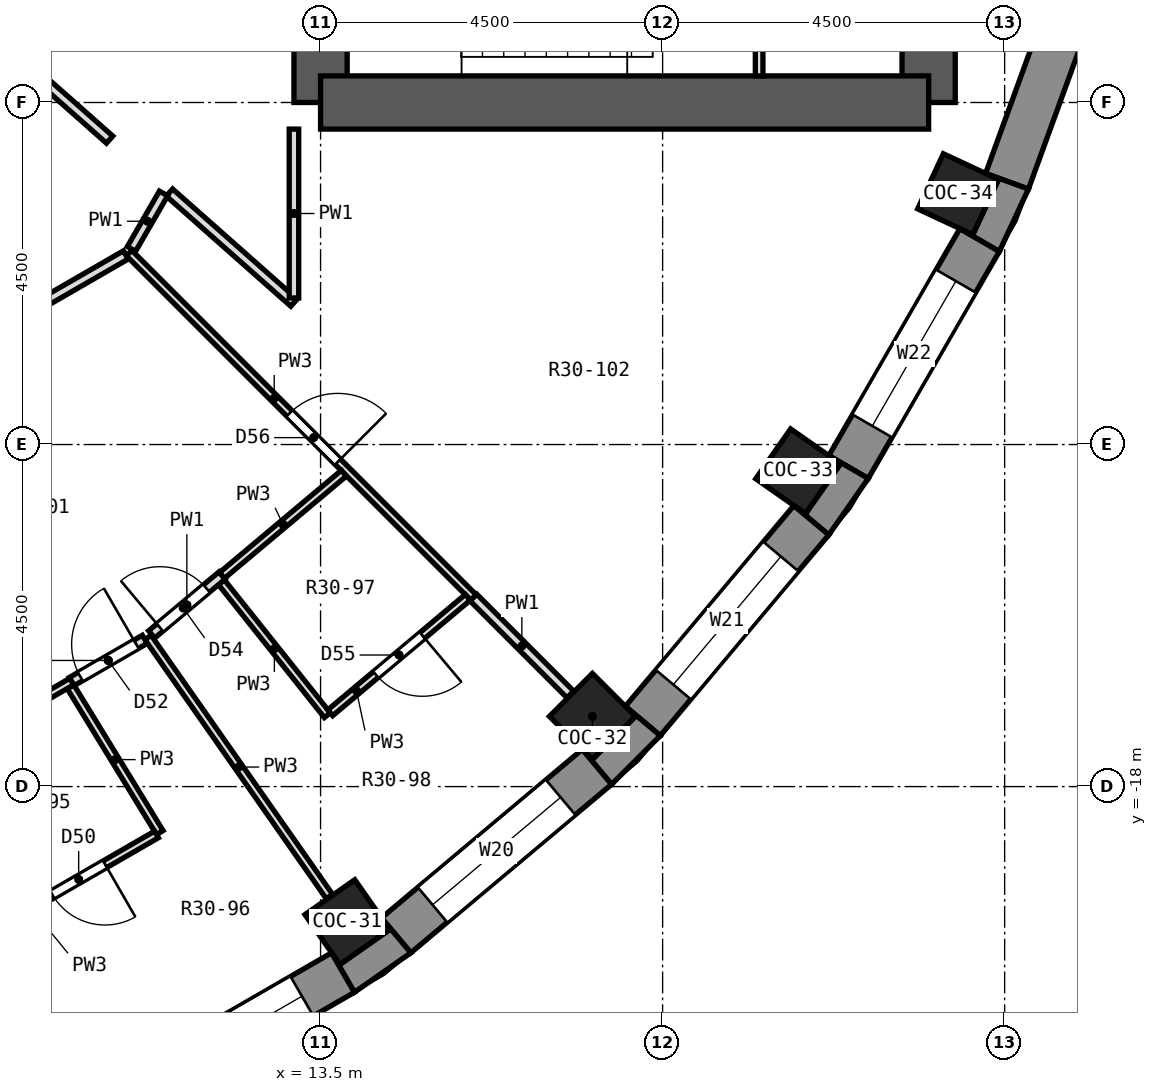
"""IFC4 building model, lengths in metres.
Left out: names, types, materials, properties, quantities, classifications, styles, units other than length and angle.
Written with IfcOpenShell. Run it as: python <this file> out.ifc"""

import sys

from ifc_helpers import new_model, si_unit, direction, frame, frame_2d, origin, origin_2d, place, context, subcontext, project, spatial, polyline, rectangle, outline, extrude, element, fill, save


model = new_model("IFC4")
c1 = context("Model", 3, precision=1e-05, world=origin(), true_north=direction((0.0, 1.0)))
c2 = subcontext(c1, "Body", "Model", "MODEL_VIEW")
j1 = project(units=[si_unit("LENGTHUNIT", "METRE"), si_unit("PLANEANGLEUNIT", "RADIAN")], contexts=[c1])
p1 = place(None, origin())
s1 = spatial("IfcSite", under=j1, at=p1, CompositionType="ELEMENT")
p2 = place(p1, origin())
s2 = spatial("IfcBuilding", under=s1, at=p2, CompositionType="ELEMENT")
p3 = place(p2, frame((0.0, 0.0, 210.3)))
s3 = spatial("IfcBuildingStorey", under=s2, at=p3, CompositionType="ELEMENT", Elevation=210.3)
for number, where, z_axis, x_axis in (
    (1, (13.852, -19.782, 0.0), (0.0, 0.0, 1.0), (0.574, -0.819, 0.0)),
    (2, (17.077, -17.077, 0.0), (0.0, 0.0, 1.0), (0.707, -0.707, 0.0)),
    (3, (19.782, -13.852, 0.0), (0.0, 0.0, 1.0), (0.819, -0.574, 0.0)),
    (4, (21.887, -10.206, 0.0), (0.0, 0.0, 1.0), (0.906, -0.423, 0.0)),
):
    element("IfcColumn", number, at=place(p3, frame(where, z_axis=z_axis, x_axis=x_axis)), inside=s3, PredefinedType="COLUMN", context=c2, shape_type="SweptSolid", body=[
        extrude(rectangle(XDim=0.8, YDim=0.8, at=origin_2d()), origin(), (0.0, 0.0, 1.0), 3.3),
    ])
p4 = place(p3, frame((13.5, -9.0, 0.0), z_axis=(0.0, 0.0, 1.0), x_axis=(0.0, 1.0, 0.0)))
e5 = element("IfcWall", 5, at=p4, inside=s3, PredefinedType="SHEAR", context=c2, shape_type="SweptSolid", body=[
    extrude(rectangle(XDim=18.0, YDim=0.7, at=frame_2d((9.0, 0.0))), origin(), (0.0, 0.0, 1.0), 3.3),
])
p5 = place(p4, frame((15.4, 0.0, 0.0)))
e6 = element("IfcOpeningElement", 6, at=p5, cuts=e5, PredefinedType="OPENING", context=c2, shape_type="SweptSolid", body=[
    extrude(rectangle(XDim=1.2, YDim=2.1, at=frame_2d((0.6, 1.05))), frame((0.0, 0.362, 0.0), z_axis=(0.0, -1.0, 0.0), x_axis=(1.0, 0.0, 0.0)), (0.0, 0.0, 1.0), 0.724),
])
p6 = place(p4, frame((1.4, 0.0, 0.0)))
e7 = element("IfcOpeningElement", 7, at=p6, cuts=e5, PredefinedType="OPENING", context=c2, shape_type="SweptSolid", body=[
    extrude(rectangle(XDim=1.2, YDim=2.1, at=frame_2d((0.6, 1.05))), frame((0.0, 0.362, 0.0), z_axis=(0.0, -1.0, 0.0), x_axis=(1.0, 0.0, 0.0)), (0.0, 0.0, 1.0), 0.724),
])
p7 = place(p4, frame((7.5, 0.0, 0.0)))
e8 = element("IfcOpeningElement", 8, at=p7, cuts=e5, PredefinedType="OPENING", context=c2, shape_type="SweptSolid", body=[
    extrude(rectangle(XDim=3.0, YDim=2.4, at=frame_2d((1.5, 1.2))), frame((0.0, 0.362, 0.0), z_axis=(0.0, -1.0, 0.0), x_axis=(1.0, 0.0, 0.0)), (0.0, 0.0, 1.0), 0.724),
])
p8 = place(p3, frame((21.5, -9.0, 0.0), z_axis=(0.0, 0.0, 1.0), x_axis=(0.0, 1.0, 0.0)))
e9 = element("IfcWall", 9, at=p8, inside=s3, PredefinedType="SHEAR", context=c2, shape_type="SweptSolid", body=[
    extrude(rectangle(XDim=18.0, YDim=0.7, at=frame_2d((9.0, 0.0))), origin(), (0.0, 0.0, 1.0), 3.3),
])
p9 = place(p8, frame((9.45, 0.0, 0.0)))
e10 = element("IfcOpeningElement", 10, at=p9, cuts=e9, PredefinedType="OPENING", context=c2, shape_type="SweptSolid", body=[
    extrude(rectangle(XDim=0.9, YDim=2.1, at=frame_2d((0.45, 1.05))), frame((0.0, 0.362, 0.0), z_axis=(0.0, -1.0, 0.0), x_axis=(1.0, 0.0, 0.0)), (0.0, 0.0, 1.0), 0.724),
])
p10 = place(p8, frame((7.65, 0.0, 0.0)))
e11 = element("IfcOpeningElement", 11, at=p10, cuts=e9, PredefinedType="OPENING", context=c2, shape_type="SweptSolid", body=[
    extrude(rectangle(XDim=0.9, YDim=2.1, at=frame_2d((0.45, 1.05))), frame((0.0, 0.362, 0.0), z_axis=(0.0, -1.0, 0.0), x_axis=(1.0, 0.0, 0.0)), (0.0, 0.0, 1.0), 0.724),
])
p11 = place(p3, frame((13.5, -9.0, 0.0), z_axis=(0.0, 0.0, 1.0), x_axis=(1.0, 0.0, 0.0)))
e12 = element("IfcWall", 12, at=p11, inside=s3, PredefinedType="SHEAR", context=c2, shape_type="SweptSolid", body=[
    extrude(rectangle(XDim=8.0, YDim=0.7, at=frame_2d((4.0, 0.0))), origin(), (0.0, 0.0, 1.0), 3.3),
])
p12 = place(p3, frame((10.809, -22.171, 0.0), z_axis=(0.0, 0.0, 1.0), x_axis=(0.86602648383, 0.499998129301, 0.0)))
e13 = element("IfcWall", 13, at=p12, inside=s3, PredefinedType="SOLIDWALL", context=c2, shape_type="SweptSolid", body=[
    extrude(rectangle(XDim=3.45, YDim=0.6, at=frame_2d((1.725, 0.0))), origin(), (0.0, 0.0, 1.0), 2.85),
])
p13 = place(p12, frame((0.625, 0.0, 0.9)))
e14 = element("IfcOpeningElement", 14, at=p13, cuts=e13, PredefinedType="OPENING", context=c2, shape_type="SweptSolid", body=[
    extrude(rectangle(XDim=2.2, YDim=1.8, at=frame_2d((1.1, 0.9))), frame((0.0, 0.312, 0.0), z_axis=(0.0, -1.0, 0.0), x_axis=(1.0, 0.0, 0.0)), (0.0, 0.0, 1.0), 0.624),
])
p14 = place(p3, frame((14.494, -19.957, 0.0), z_axis=(0.0, 0.0, 1.0), x_axis=(0.766058884809, 0.642770398358, 0.0)))
e15 = element("IfcWall", 15, at=p14, inside=s3, PredefinedType="SOLIDWALL", context=c2, shape_type="SweptSolid", body=[
    extrude(rectangle(XDim=3.449, YDim=0.6, at=frame_2d((1.725, 0.0))), origin(), (0.0, 0.0, 1.0), 2.85),
])
p15 = place(p14, frame((0.625, 0.0, 0.9)))
e16 = element("IfcOpeningElement", 16, at=p15, cuts=e15, PredefinedType="OPENING", context=c2, shape_type="SweptSolid", body=[
    extrude(rectangle(XDim=2.2, YDim=1.8, at=frame_2d((1.1, 0.9))), frame((0.0, 0.312, 0.0), z_axis=(0.0, -1.0, 0.0), x_axis=(1.0, 0.0, 0.0)), (0.0, 0.0, 1.0), 0.624),
])
p16 = place(p3, frame((17.74, -17.137, 0.0), z_axis=(0.0, 0.0, 1.0), x_axis=(0.642770398358, 0.766058884809, 0.0)))
e17 = element("IfcWall", 17, at=p16, inside=s3, PredefinedType="SOLIDWALL", context=c2, shape_type="SweptSolid", body=[
    extrude(rectangle(XDim=3.449, YDim=0.6, at=frame_2d((1.725, 0.0))), origin(), (0.0, 0.0, 1.0), 2.85),
])
p17 = place(p16, frame((0.625, 0.0, 0.9)))
e18 = element("IfcOpeningElement", 18, at=p17, cuts=e17, PredefinedType="OPENING", context=c2, shape_type="SweptSolid", body=[
    extrude(rectangle(XDim=2.2, YDim=1.8, at=frame_2d((1.1, 0.9))), frame((0.0, 0.312, 0.0), z_axis=(0.0, -1.0, 0.0), x_axis=(1.0, 0.0, 0.0)), (0.0, 0.0, 1.0), 0.624),
])
p18 = place(p3, frame((20.446, -13.796, 0.0), z_axis=(0.0, 0.0, 1.0), x_axis=(0.499998129301, 0.86602648383, 0.0)))
e19 = element("IfcWall", 19, at=p18, inside=s3, PredefinedType="SOLIDWALL", context=c2, shape_type="SweptSolid", body=[
    extrude(rectangle(XDim=3.45, YDim=0.6, at=frame_2d((1.725, 0.0))), origin(), (0.0, 0.0, 1.0), 2.85),
])
p19 = place(p18, frame((0.625, 0.0, 0.9)))
e20 = element("IfcOpeningElement", 20, at=p19, cuts=e19, PredefinedType="OPENING", context=c2, shape_type="SweptSolid", body=[
    extrude(rectangle(XDim=2.2, YDim=1.8, at=frame_2d((1.1, 0.9))), frame((0.0, 0.312, 0.0), z_axis=(0.0, -1.0, 0.0), x_axis=(1.0, 0.0, 0.0)), (0.0, 0.0, 1.0), 0.624),
])
p20 = place(p3, frame((22.531, -10.036, 0.0), z_axis=(0.0, 0.0, 1.0), x_axis=(0.342032843455, 0.93968799822, 0.0)))
e21 = element("IfcWall", 21, at=p20, inside=s3, PredefinedType="SOLIDWALL", context=c2, shape_type="SweptSolid", body=[
    extrude(rectangle(XDim=3.45, YDim=0.6, at=frame_2d((1.725, 0.0))), origin(), (0.0, 0.0, 1.0), 2.85),
])
p21 = place(p3, origin())
e22 = element("IfcWall", 22, at=p21, inside=s3, PredefinedType="SOLIDWALL", context=c2, shape_type="SweptSolid", body=[
    extrude(outline(polyline([(13.946, -20.706), (14.687, -20.187), (14.302, -19.727), (14.409, -19.881), (13.754, -20.34), (13.646, -20.186), (13.946, -20.706)])), origin(), (0.0, 0.0, 1.0), 2.85),
])
p22 = place(p3, origin())
e23 = element("IfcWall", 23, at=p22, inside=s3, PredefinedType="SOLIDWALL", context=c2, shape_type="SweptSolid", body=[
    extrude(outline(polyline([(17.969, -17.33), (17.51, -16.944), (17.642, -17.077), (17.077, -17.642), (16.944, -17.51), (17.33, -17.969), (17.969, -17.33)])), origin(), (0.0, 0.0, 1.0), 2.85),
])
p23 = place(p3, origin())
e24 = element("IfcWall", 24, at=p23, inside=s3, PredefinedType="SOLIDWALL", context=c2, shape_type="SweptSolid", body=[
    extrude(outline(polyline([(20.187, -14.687), (20.706, -13.946), (20.186, -13.646), (20.34, -13.754), (19.881, -14.409), (19.727, -14.302), (20.187, -14.687)])), origin(), (0.0, 0.0, 1.0), 2.85),
])
p24 = place(p3, origin())
e25 = element("IfcWall", 25, at=p24, inside=s3, PredefinedType="SOLIDWALL", context=c2, shape_type="SweptSolid", body=[
    extrude(outline(polyline([(22.813, -10.139), (22.249, -9.934), (22.419, -10.013), (22.081, -10.738), (21.911, -10.659), (22.431, -10.959), (22.813, -10.139)])), origin(), (0.0, 0.0, 1.0), 2.85),
])
p25 = place(p3, frame((8.275, -17.745, 0.0), z_axis=(0.0, 0.0, 1.0), x_axis=(0.42246777717, -0.906377943936, 0.0)))
e26 = element("IfcWall", 26, at=p25, inside=s3, PredefinedType="PARTITIONING", context=c2, shape_type="SweptSolid", body=[
    extrude(rectangle(XDim=4.16, YDim=0.1, at=frame_2d((2.08, 0.0))), origin(), (0.0, 0.0, 1.0), 2.85),
])
p26 = place(p3, frame((10.21, -16.686, 0.0), z_axis=(0.0, 0.0, 1.0), x_axis=(0.522037907824, -0.852922284147, 0.0)))
e27 = element("IfcWall", 27, at=p26, inside=s3, PredefinedType="PARTITIONING", context=c2, shape_type="SweptSolid", body=[
    extrude(rectangle(XDim=2.25, YDim=0.1, at=frame_2d((1.125, 0.0))), origin(), (0.0, 0.0, 1.0), 2.85),
])
p27 = place(p3, frame((11.23, -16.038, 0.0), z_axis=(0.0, 0.0, 1.0), x_axis=(0.573525346877, -0.81918781515, 0.0)))
e28 = element("IfcWall", 28, at=p27, inside=s3, PredefinedType="PARTITIONING", context=c2, shape_type="SweptSolid", body=[
    extrude(rectangle(XDim=4.161, YDim=0.1, at=frame_2d((2.081, 0.0))), origin(), (0.0, 0.0, 1.0), 2.85),
])
p28 = place(p3, frame((12.195, -15.311, 0.0), z_axis=(0.0, 0.0, 1.0), x_axis=(0.623070217722, -0.782165905539, 0.0)))
e29 = element("IfcWall", 29, at=p28, inside=s3, PredefinedType="PARTITIONING", context=c2, shape_type="SweptSolid", body=[
    extrude(rectangle(XDim=2.237, YDim=0.1, at=frame_2d((1.119, 0.0))), origin(), (0.0, 0.0, 1.0), 2.85),
])
p29 = place(p3, frame((10.981, -10.981, 0.0), z_axis=(0.0, 0.0, 1.0), x_axis=(0.707106781187, -0.707106781187, 0.0)))
e30 = element("IfcWall", 30, at=p29, inside=s3, PredefinedType="PARTITIONING", context=c2, shape_type="SweptSolid", body=[
    extrude(rectangle(XDim=6.408, YDim=0.1, at=frame_2d((3.204, 0.0))), origin(), (0.0, 0.0, 1.0), 2.85),
])
p30 = place(p29, frame((2.984, 0.0, 0.0)))
e31 = element("IfcOpeningElement", 31, at=p30, cuts=e30, PredefinedType="OPENING", context=c2, shape_type="SweptSolid", body=[
    extrude(rectangle(XDim=0.9, YDim=2.1, at=frame_2d((0.45, 1.05))), frame((0.0, 0.062, 0.0), z_axis=(0.0, -1.0, 0.0), x_axis=(1.0, 0.0, 0.0)), (0.0, 0.0, 1.0), 0.124),
])
p31 = place(p3, frame((15.511, -15.513, 0.0), z_axis=(0.0, 0.0, 1.0), x_axis=(0.707106781187, -0.707106781187, 0.0)))
e32 = element("IfcWall", 32, at=p31, inside=s3, PredefinedType="PARTITIONING", context=c2, shape_type="SweptSolid", body=[
    extrude(rectangle(XDim=1.802, YDim=0.125, at=frame_2d((0.901, 0.0))), origin(), (0.0, 0.0, 1.0), 2.85),
])
p32 = place(p3, frame((6.42, -5.68, 0.0), z_axis=(0.0, 0.0, 1.0), x_axis=(0.74898196967, -0.662590378068, 0.0)))
e33 = element("IfcWall", 33, at=p32, inside=s3, PredefinedType="PARTITIONING", context=c2, shape_type="SweptSolid", body=[
    extrude(rectangle(XDim=5.748, YDim=0.125, at=frame_2d((2.874, 0.0))), origin(), (0.0, 0.0, 1.0), 2.85),
])
p33 = place(p3, frame((11.512, -10.185, 0.0), z_axis=(0.0, 0.0, 1.0), x_axis=(0.748928386133, -0.66265094314, 0.0)))
e34 = element("IfcWall", 34, at=p33, inside=s3, PredefinedType="PARTITIONING", context=c2, shape_type="SweptSolid", body=[
    extrude(rectangle(XDim=2.187, YDim=0.125, at=frame_2d((1.094, 0.0))), origin(), (0.0, 0.0, 1.0), 2.85),
])
p34 = place(p3, frame((9.293, -19.812, 0.0), z_axis=(0.0, 0.0, 1.0), x_axis=(0.866139183788, 0.49980287545, 0.0)))
e35 = element("IfcWall", 35, at=p34, inside=s3, PredefinedType="PARTITIONING", context=c2, shape_type="SweptSolid", body=[
    extrude(rectangle(XDim=2.365, YDim=0.1, at=frame_2d((1.183, 0.0))), origin(), (0.0, 0.0, 1.0), 2.85),
])
p35 = place(p34, frame((0.782, 0.0, 0.0)))
e36 = element("IfcOpeningElement", 36, at=p35, cuts=e35, PredefinedType="OPENING", context=c2, shape_type="SweptSolid", body=[
    extrude(rectangle(XDim=0.8, YDim=2.1, at=frame_2d((0.4, 1.05))), frame((0.0, 0.062, 0.0), z_axis=(0.0, -1.0, 0.0), x_axis=(1.0, 0.0, 0.0)), (0.0, 0.0, 1.0), 0.124),
])
p36 = place(p3, frame((8.318, -17.72, 0.0), z_axis=(0.0, 0.0, 1.0), x_axis=(0.866039875853, 0.499974932805, 0.0)))
e37 = element("IfcWall", 37, at=p36, inside=s3, PredefinedType="PARTITIONING", context=c2, shape_type="SweptSolid", body=[
    extrude(rectangle(XDim=2.204, YDim=0.1, at=frame_2d((1.102, 0.0))), origin(), (0.0, 0.0, 1.0), 2.85),
])
p37 = place(p3, frame((10.227, -16.618, 0.0), z_axis=(0.0, 0.0, 1.0), x_axis=(0.865642357341, 0.50066286978, 0.0)))
e38 = element("IfcWall", 38, at=p37, inside=s3, PredefinedType="PARTITIONING", context=c2, shape_type="SweptSolid", body=[
    extrude(rectangle(XDim=1.108, YDim=0.125, at=frame_2d((0.554, 0.0))), origin(), (0.0, 0.0, 1.0), 2.85),
])
p38 = place(p37, frame((0.129, 0.0, 0.0)))
e39 = element("IfcOpeningElement", 39, at=p38, cuts=e38, PredefinedType="OPENING", context=c2, shape_type="SweptSolid", body=[
    extrude(rectangle(XDim=0.85, YDim=2.1, at=frame_2d((0.425, 1.05))), frame((0.0, 0.074, 0.0), z_axis=(0.0, -1.0, 0.0), x_axis=(1.0, 0.0, 0.0)), (0.0, 0.0, 1.0), 0.149),
])
p39 = place(p3, frame((4.073, -14.969, 0.0), z_axis=(0.0, 0.0, 1.0), x_axis=(0.866056845741, 0.499945536979, 0.0)))
e40 = element("IfcWall", 40, at=p39, inside=s3, PredefinedType="PARTITIONING", context=c2, shape_type="SweptSolid", body=[
    extrude(rectangle(XDim=7.926, YDim=0.125, at=frame_2d((3.963, 0.0))), origin(), (0.0, 0.0, 1.0), 2.85),
])
p40 = place(p3, frame((11.278, -15.998, 0.0), z_axis=(0.0, 0.0, 1.0), x_axis=(0.766877941262, 0.641792975348, 0.0)))
e41 = element("IfcWall", 41, at=p40, inside=s3, PredefinedType="PARTITIONING", context=c2, shape_type="SweptSolid", body=[
    extrude(rectangle(XDim=1.208, YDim=0.125, at=frame_2d((0.604, 0.0))), origin(), (0.0, 0.0, 1.0), 2.85),
])
p41 = place(p40, frame((0.142, 0.0, 0.0)))
e42 = element("IfcOpeningElement", 42, at=p41, cuts=e41, PredefinedType="OPENING", context=c2, shape_type="SweptSolid", body=[
    extrude(rectangle(XDim=0.8, YDim=2.1, at=frame_2d((0.4, 1.05))), frame((0.0, 0.074, 0.0), z_axis=(0.0, -1.0, 0.0), x_axis=(1.0, 0.0, 0.0)), (0.0, 0.0, 1.0), 0.149),
])
p42 = place(p3, frame((13.627, -17.029, 0.0), z_axis=(0.0, 0.0, 1.0), x_axis=(0.766091436164, 0.642731601399, 0.0)))
e43 = element("IfcWall", 43, at=p42, inside=s3, PredefinedType="PARTITIONING", context=c2, shape_type="SweptSolid", body=[
    extrude(rectangle(XDim=2.363, YDim=0.1, at=frame_2d((1.182, 0.0))), origin(), (0.0, 0.0, 1.0), 2.85),
])
p43 = place(p42, frame((0.782, 0.0, 0.0)))
e44 = element("IfcOpeningElement", 44, at=p43, cuts=e43, PredefinedType="OPENING", context=c2, shape_type="SweptSolid", body=[
    extrude(rectangle(XDim=0.8, YDim=2.1, at=frame_2d((0.4, 1.05))), frame((0.0, 0.062, 0.0), z_axis=(0.0, -1.0, 0.0), x_axis=(1.0, 0.0, 0.0)), (0.0, 0.0, 1.0), 0.124),
])
p44 = place(p3, frame((12.204, -15.222, 0.0), z_axis=(0.0, 0.0, 1.0), x_axis=(0.766132236748, 0.6426829668, 0.0)))
e45 = element("IfcWall", 45, at=p44, inside=s3, PredefinedType="PARTITIONING", context=c2, shape_type="SweptSolid", body=[
    extrude(rectangle(XDim=2.092, YDim=0.1, at=frame_2d((1.046, 0.0))), origin(), (0.0, 0.0, 1.0), 2.85),
])
p45 = place(p3, frame((11.012, -10.927, 0.0), z_axis=(0.0, 0.0, 1.0), x_axis=(0.500190688257, 0.865915281873, 0.0)))
e46 = element("IfcWall", 46, at=p45, inside=s3, PredefinedType="PARTITIONING", context=c2, shape_type="SweptSolid", body=[
    extrude(rectangle(XDim=0.843, YDim=0.125, at=frame_2d((0.421, 0.0))), origin(), (0.0, 0.0, 1.0), 2.85),
])
p46 = place(p3, frame((13.15, -11.572, 0.0), z_axis=(0.0, 0.0, 1.0), x_axis=(0.0, 1.0, 0.0)))
e47 = element("IfcWall", 47, at=p46, inside=s3, PredefinedType="PARTITIONING", context=c2, shape_type="SweptSolid", body=[
    extrude(rectangle(XDim=2.221, YDim=0.125, at=frame_2d((1.111, 0.0))), origin(), (0.0, 0.0, 1.0), 2.85),
])
p47 = place(p3, frame((19.27, -8.65, 0.0), z_axis=(0.0, 0.0, 1.0), x_axis=(0.0, 1.0, 0.0)))
e48 = element("IfcWall", 48, at=p47, inside=s3, PredefinedType="PARTITIONING", context=c2, shape_type="SweptSolid", body=[
    extrude(rectangle(XDim=3.45, YDim=0.1, at=frame_2d((1.725, 0.0))), origin(), (0.0, 0.0, 1.0), 2.85),
])
p48 = place(p13, origin())
e49 = element("IfcWindow", 49, at=p48, inside=s3, PartitioningType="SINGLE_PANEL", PredefinedType="WINDOW", context=c2, shape_type="SweptSolid", body=[
    extrude(rectangle(XDim=2.2, YDim=1.8, at=frame_2d((1.1, 0.9))), frame((0.0, 0.18, 0.0), z_axis=(0.0, -1.0, 0.0), x_axis=(1.0, 0.0, 0.0)), (0.0, 0.0, 1.0), 0.06),
])
fill(e14, e49)
p49 = place(p15, origin())
e50 = element("IfcWindow", 50, at=p49, inside=s3, PartitioningType="SINGLE_PANEL", PredefinedType="WINDOW", context=c2, shape_type="SweptSolid", body=[
    extrude(rectangle(XDim=2.2, YDim=1.8, at=frame_2d((1.1, 0.9))), frame((0.0, 0.18, 0.0), z_axis=(0.0, -1.0, 0.0), x_axis=(1.0, 0.0, 0.0)), (0.0, 0.0, 1.0), 0.06),
])
fill(e16, e50)
p50 = place(p17, origin())
e51 = element("IfcWindow", 51, at=p50, inside=s3, PartitioningType="SINGLE_PANEL", PredefinedType="WINDOW", context=c2, shape_type="SweptSolid", body=[
    extrude(rectangle(XDim=2.2, YDim=1.8, at=frame_2d((1.1, 0.9))), frame((0.0, 0.18, 0.0), z_axis=(0.0, -1.0, 0.0), x_axis=(1.0, 0.0, 0.0)), (0.0, 0.0, 1.0), 0.06),
])
fill(e18, e51)
p51 = place(p19, origin())
e52 = element("IfcWindow", 52, at=p51, inside=s3, PartitioningType="SINGLE_PANEL", PredefinedType="WINDOW", context=c2, shape_type="SweptSolid", body=[
    extrude(rectangle(XDim=2.2, YDim=1.8, at=frame_2d((1.1, 0.9))), frame((0.0, 0.18, 0.0), z_axis=(0.0, -1.0, 0.0), x_axis=(1.0, 0.0, 0.0)), (0.0, 0.0, 1.0), 0.06),
])
fill(e20, e52)
p52 = place(p35, frame((0.8, 0.0, 0.0), z_axis=(0.0, 0.0, 1.0), x_axis=(-1.0, 0.0, 0.0)))
e53 = element("IfcDoor", 53, at=p52, inside=s3, OperationType="SINGLE_SWING_LEFT", PredefinedType="DOOR", context=c2, shape_type="SweptSolid", body=[
    extrude(rectangle(XDim=0.8, YDim=2.1, at=frame_2d((0.4, 1.05))), frame((0.0, 0.025, 0.0), z_axis=(0.0, -1.0, 0.0), x_axis=(1.0, 0.0, 0.0)), (0.0, 0.0, 1.0), 0.05),
])
fill(e36, e53)
p53 = place(p38, origin())
e54 = element("IfcDoor", 54, at=p53, inside=s3, OperationType="SINGLE_SWING_RIGHT", PredefinedType="DOOR", context=c2, shape_type="SweptSolid", body=[
    extrude(rectangle(XDim=0.85, YDim=2.1, at=frame_2d((0.425, 1.05))), frame((0.0, 0.025, 0.0), z_axis=(0.0, -1.0, 0.0), x_axis=(1.0, 0.0, 0.0)), (0.0, 0.0, 1.0), 0.05),
])
fill(e39, e54)
p54 = place(p41, origin())
e55 = element("IfcDoor", 55, at=p54, inside=s3, OperationType="SINGLE_SWING_LEFT", PredefinedType="DOOR", context=c2, shape_type="SweptSolid", body=[
    extrude(rectangle(XDim=0.8, YDim=2.1, at=frame_2d((0.4, 1.05))), frame((0.0, 0.025, 0.0), z_axis=(0.0, -1.0, 0.0), x_axis=(1.0, 0.0, 0.0)), (0.0, 0.0, 1.0), 0.05),
])
fill(e42, e55)
p55 = place(p43, frame((0.8, 0.0, 0.0), z_axis=(0.0, 0.0, 1.0), x_axis=(-1.0, 0.0, 0.0)))
e56 = element("IfcDoor", 56, at=p55, inside=s3, OperationType="SINGLE_SWING_LEFT", PredefinedType="DOOR", context=c2, shape_type="SweptSolid", body=[
    extrude(rectangle(XDim=0.8, YDim=2.1, at=frame_2d((0.4, 1.05))), frame((0.0, 0.025, 0.0), z_axis=(0.0, -1.0, 0.0), x_axis=(1.0, 0.0, 0.0)), (0.0, 0.0, 1.0), 0.05),
])
fill(e44, e56)
p56 = place(p30, origin())
e57 = element("IfcDoor", 57, at=p56, inside=s3, OperationType="SINGLE_SWING_RIGHT", PredefinedType="DOOR", context=c2, shape_type="SweptSolid", body=[
    extrude(rectangle(XDim=0.9, YDim=2.1, at=frame_2d((0.45, 1.05))), frame((0.0, 0.025, 0.0), z_axis=(0.0, -1.0, 0.0), x_axis=(1.0, 0.0, 0.0)), (0.0, 0.0, 1.0), 0.05),
])
fill(e31, e57)
save(model, sys.argv[1])
